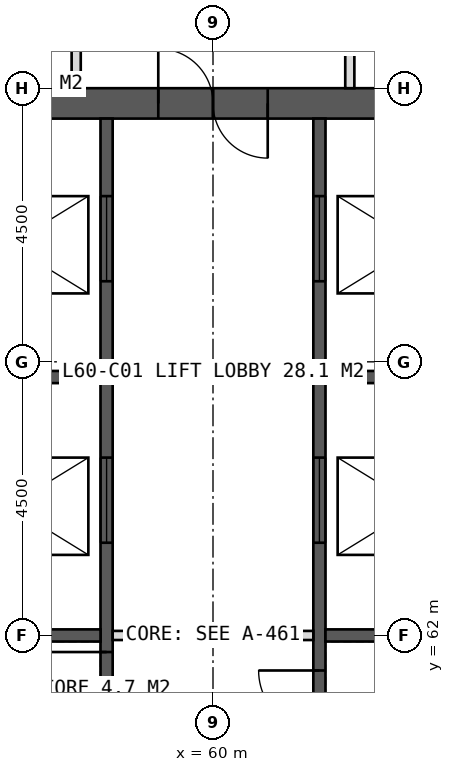
"""IFC4 building model, lengths in metres.
Left out: names, types, materials, properties, quantities, classifications, styles, units other than length and angle.
Written with IfcOpenShell. Run it as: python <this file> out.ifc"""

import sys

from ifc_helpers import new_model, si_unit, direction, frame, frame_2d, origin, place, context, subcontext, project, spatial, rectangle, extrude, element, fill, save


model = new_model("IFC4")
c1 = context("Model", 3, precision=1e-05, world=origin(), true_north=direction((0.0, 1.0)))
c2 = subcontext(c1, "Body", "Model", "MODEL_VIEW")
j1 = project(units=[si_unit("LENGTHUNIT", "METRE"), si_unit("PLANEANGLEUNIT", "RADIAN")], contexts=[c1])
p1 = place(None, origin())
s1 = spatial("IfcSite", under=j1, at=p1, CompositionType="ELEMENT")
p2 = place(p1, origin())
s2 = spatial("IfcBuilding", under=s1, at=p2, CompositionType="ELEMENT")
p3 = place(p2, frame((0.0, 0.0, 250.0)))
s3 = spatial("IfcBuildingStorey", under=s2, at=p3, CompositionType="ELEMENT", Elevation=250.0)
p4 = place(p3, frame((51.0, 70.75, 0.0), z_axis=(0.0, 0.0, 1.0), x_axis=(1.0, 0.0, 0.0)))
e1 = element("IfcWall", 1, at=p4, inside=s3, PredefinedType="SHEAR", context=c2, shape_type="SweptSolid", body=[
    extrude(rectangle(XDim=18.0, YDim=0.5, at=frame_2d((9.0, 0.0))), origin(), (0.0, 0.0, 1.0), 4.0),
])
p5 = place(p4, frame((8.1, 0.0, 0.0)))
e2 = element("IfcOpeningElement", 2, at=p5, cuts=e1, PredefinedType="OPENING", context=c2, shape_type="SweptSolid", body=[
    extrude(rectangle(XDim=1.8, YDim=2.2, at=frame_2d((0.9, 1.1))), frame((0.0, 0.26, 0.0), z_axis=(0.0, -1.0, 0.0), x_axis=(1.0, 0.0, 0.0)), (0.0, 0.0, 1.0), 0.52),
])
p6 = place(p3, frame((58.25, 53.5, 0.0), z_axis=(0.0, 0.0, 1.0), x_axis=(0.0, 1.0, 0.0)))
e3 = element("IfcWall", 3, at=p6, inside=s3, PredefinedType="SHEAR", context=c2, shape_type="SweptSolid", body=[
    extrude(rectangle(XDim=17.0, YDim=0.2, at=frame_2d((8.5, 0.0))), origin(), (0.0, 0.0, 1.0), 4.0),
])
p7 = place(p6, frame((0.393, 0.0, 0.0)))
e4 = element("IfcOpeningElement", 4, at=p7, cuts=e3, PredefinedType="OPENING", context=c2, shape_type="SweptSolid", body=[
    extrude(rectangle(XDim=1.0, YDim=2.1, at=frame_2d((0.5, 1.05))), frame((0.0, 0.11, 0.0), z_axis=(0.0, -1.0, 0.0), x_axis=(1.0, 0.0, 0.0)), (0.0, 0.0, 1.0), 0.22),
])
p8 = place(p6, frame((2.542, 0.0, 0.0)))
e5 = element("IfcOpeningElement", 5, at=p8, cuts=e3, PredefinedType="OPENING", context=c2, shape_type="SweptSolid", body=[
    extrude(rectangle(XDim=1.0, YDim=2.1, at=frame_2d((0.5, 1.05))), frame((0.0, 0.11, 0.0), z_axis=(0.0, -1.0, 0.0), x_axis=(1.0, 0.0, 0.0)), (0.0, 0.0, 1.0), 0.22),
])
p9 = place(p6, frame((5.127, 0.0, 0.0)))
e6 = element("IfcOpeningElement", 6, at=p9, cuts=e3, PredefinedType="OPENING", context=c2, shape_type="SweptSolid", body=[
    extrude(rectangle(XDim=1.0, YDim=2.1, at=frame_2d((0.5, 1.05))), frame((0.0, 0.11, 0.0), z_axis=(0.0, -1.0, 0.0), x_axis=(1.0, 0.0, 0.0)), (0.0, 0.0, 1.0), 0.22),
])
p10 = place(p6, frame((7.228, 0.0, 0.0)))
e7 = element("IfcOpeningElement", 7, at=p10, cuts=e3, PredefinedType="OPENING", context=c2, shape_type="SweptSolid", body=[
    extrude(rectangle(XDim=1.0, YDim=2.1, at=frame_2d((0.5, 1.05))), frame((0.0, 0.11, 0.0), z_axis=(0.0, -1.0, 0.0), x_axis=(1.0, 0.0, 0.0)), (0.0, 0.0, 1.0), 0.22),
])
p11 = place(p6, frame((10.025, 0.0, 0.0)))
e8 = element("IfcOpeningElement", 8, at=p11, cuts=e3, PredefinedType="OPENING", context=c2, shape_type="SweptSolid", body=[
    extrude(rectangle(XDim=1.4, YDim=2.2, at=frame_2d((0.7, 1.1))), frame((0.0, 0.11, 0.0), z_axis=(0.0, -1.0, 0.0), x_axis=(1.0, 0.0, 0.0)), (0.0, 0.0, 1.0), 0.22),
])
p12 = place(p6, frame((14.325, 0.0, 0.0)))
e9 = element("IfcOpeningElement", 9, at=p12, cuts=e3, PredefinedType="OPENING", context=c2, shape_type="SweptSolid", body=[
    extrude(rectangle(XDim=1.4, YDim=2.2, at=frame_2d((0.7, 1.1))), frame((0.0, 0.11, 0.0), z_axis=(0.0, -1.0, 0.0), x_axis=(1.0, 0.0, 0.0)), (0.0, 0.0, 1.0), 0.22),
])
p13 = place(p3, frame((61.75, 53.5, 0.0), z_axis=(0.0, 0.0, 1.0), x_axis=(0.0, 1.0, 0.0)))
e10 = element("IfcWall", 10, at=p13, inside=s3, PredefinedType="SHEAR", context=c2, shape_type="SweptSolid", body=[
    extrude(rectangle(XDim=17.0, YDim=0.2, at=frame_2d((8.5, 0.0))), origin(), (0.0, 0.0, 1.0), 4.0),
])
p14 = place(p13, frame((0.6, 0.0, 0.0)))
e11 = element("IfcOpeningElement", 11, at=p14, cuts=e10, PredefinedType="OPENING", context=c2, shape_type="SweptSolid", body=[
    extrude(rectangle(XDim=1.0, YDim=2.1, at=frame_2d((0.5, 1.05))), frame((0.0, 0.11, 0.0), z_axis=(0.0, -1.0, 0.0), x_axis=(1.0, 0.0, 0.0)), (0.0, 0.0, 1.0), 0.22),
])
p15 = place(p13, frame((2.75, 0.0, 0.0)))
e12 = element("IfcOpeningElement", 12, at=p15, cuts=e10, PredefinedType="OPENING", context=c2, shape_type="SweptSolid", body=[
    extrude(rectangle(XDim=1.0, YDim=2.1, at=frame_2d((0.5, 1.05))), frame((0.0, 0.11, 0.0), z_axis=(0.0, -1.0, 0.0), x_axis=(1.0, 0.0, 0.0)), (0.0, 0.0, 1.0), 0.22),
])
p16 = place(p13, frame((4.824, 0.0, 0.0)))
e13 = element("IfcOpeningElement", 13, at=p16, cuts=e10, PredefinedType="OPENING", context=c2, shape_type="SweptSolid", body=[
    extrude(rectangle(XDim=1.0, YDim=2.1, at=frame_2d((0.5, 1.05))), frame((0.0, 0.11, 0.0), z_axis=(0.0, -1.0, 0.0), x_axis=(1.0, 0.0, 0.0)), (0.0, 0.0, 1.0), 0.22),
])
p17 = place(p13, frame((6.924, 0.0, 0.0)))
e14 = element("IfcOpeningElement", 14, at=p17, cuts=e10, PredefinedType="OPENING", context=c2, shape_type="SweptSolid", body=[
    extrude(rectangle(XDim=1.0, YDim=2.1, at=frame_2d((0.5, 1.05))), frame((0.0, 0.11, 0.0), z_axis=(0.0, -1.0, 0.0), x_axis=(1.0, 0.0, 0.0)), (0.0, 0.0, 1.0), 0.22),
])
p18 = place(p13, frame((10.025, 0.0, 0.0)))
e15 = element("IfcOpeningElement", 15, at=p18, cuts=e10, PredefinedType="OPENING", context=c2, shape_type="SweptSolid", body=[
    extrude(rectangle(XDim=1.4, YDim=2.2, at=frame_2d((0.7, 1.1))), frame((0.0, 0.11, 0.0), z_axis=(0.0, -1.0, 0.0), x_axis=(1.0, 0.0, 0.0)), (0.0, 0.0, 1.0), 0.22),
])
p19 = place(p13, frame((14.325, 0.0, 0.0)))
e16 = element("IfcOpeningElement", 16, at=p19, cuts=e10, PredefinedType="OPENING", context=c2, shape_type="SweptSolid", body=[
    extrude(rectangle(XDim=1.4, YDim=2.2, at=frame_2d((0.7, 1.1))), frame((0.0, 0.11, 0.0), z_axis=(0.0, -1.0, 0.0), x_axis=(1.0, 0.0, 0.0)), (0.0, 0.0, 1.0), 0.22),
])
for number, where, z_axis, x_axis in (
    (17, (55.1, 62.0, 0.0), (0.0, 0.0, 1.0), (1.0, 0.0, 0.0)),
    (18, (61.85, 62.0, 0.0), (0.0, 0.0, 1.0), (1.0, 0.0, 0.0)),
    (19, (55.1, 66.25, 0.0), (0.0, 0.0, 1.0), (1.0, 0.0, 0.0)),
    (20, (61.85, 66.25, 0.0), (0.0, 0.0, 1.0), (1.0, 0.0, 0.0)),
):
    element("IfcWall", number, at=place(p3, frame(where, z_axis=z_axis, x_axis=x_axis)), inside=s3, PredefinedType="SHEAR", context=c2, shape_type="SweptSolid", body=[
        extrude(rectangle(XDim=3.05, YDim=0.2, at=frame_2d((1.525, 0.0))), origin(), (0.0, 0.0, 1.0), 4.0),
    ])
for number, where, z_axis, x_axis in (
    (21, (57.75, 71.0, 0.0), (0.0, 0.0, 1.0), (0.0, 1.0, 0.0)),
    (22, (62.25, 71.0, 0.0), (0.0, 0.0, 1.0), (0.0, 1.0, 0.0)),
):
    element("IfcWall", number, at=place(p3, frame(where, z_axis=z_axis, x_axis=x_axis)), inside=s3, PredefinedType="PARTITIONING", context=c2, shape_type="SweptSolid", body=[
        extrude(rectangle(XDim=1.5, YDim=0.15, at=frame_2d((0.75, 0.0))), origin(), (0.0, 0.0, 1.0), 3.75),
    ])
p20 = place(p3, frame((58.35, 62.0, 0.0), z_axis=(0.0, 0.0, 1.0), x_axis=(1.0, 0.0, 0.0)))
e23 = element("IfcWall", 23, at=p20, inside=s3, PredefinedType="PARTITIONING", context=c2, shape_type="SweptSolid", body=[
    extrude(rectangle(XDim=3.3, YDim=0.15, at=frame_2d((1.65, 0.0))), origin(), (0.0, 0.0, 1.0), 3.75),
])
p21 = place(p5, origin())
e24 = element("IfcDoor", 24, at=p21, inside=s3, OperationType="DOUBLE_DOOR_SINGLE_SWING", PredefinedType="DOOR", context=c2, shape_type="SweptSolid", body=[
    extrude(rectangle(XDim=1.8, YDim=2.2, at=frame_2d((0.9, 1.1))), frame((0.0, 0.025, 0.0), z_axis=(0.0, -1.0, 0.0), x_axis=(1.0, 0.0, 0.0)), (0.0, 0.0, 1.0), 0.05),
])
fill(e2, e24)
p22 = place(p10, origin())
e25 = element("IfcDoor", 25, at=p22, inside=s3, OperationType="SINGLE_SWING_RIGHT", PredefinedType="DOOR", context=c2, shape_type="SweptSolid", body=[
    extrude(rectangle(XDim=1.0, YDim=2.1, at=frame_2d((0.5, 1.05))), frame((0.0, 0.025, 0.0), z_axis=(0.0, -1.0, 0.0), x_axis=(1.0, 0.0, 0.0)), (0.0, 0.0, 1.0), 0.05),
])
fill(e7, e25)
p23 = place(p17, origin())
e26 = element("IfcDoor", 26, at=p23, inside=s3, OperationType="SINGLE_SWING_RIGHT", PredefinedType="DOOR", context=c2, shape_type="SweptSolid", body=[
    extrude(rectangle(XDim=1.0, YDim=2.1, at=frame_2d((0.5, 1.05))), frame((0.0, 0.025, 0.0), z_axis=(0.0, -1.0, 0.0), x_axis=(1.0, 0.0, 0.0)), (0.0, 0.0, 1.0), 0.05),
])
fill(e14, e26)
p24 = place(p11, origin())
e27 = element("IfcDoor", 27, at=p24, inside=s3, OperationType="SLIDING_TO_LEFT", PredefinedType="DOOR", context=c2, shape_type="SweptSolid", body=[
    extrude(rectangle(XDim=1.4, YDim=2.2, at=frame_2d((0.7, 1.1))), frame((0.0, 0.025, 0.0), z_axis=(0.0, -1.0, 0.0), x_axis=(1.0, 0.0, 0.0)), (0.0, 0.0, 1.0), 0.05),
])
fill(e8, e27)
p25 = place(p18, origin())
e28 = element("IfcDoor", 28, at=p25, inside=s3, OperationType="SLIDING_TO_LEFT", PredefinedType="DOOR", context=c2, shape_type="SweptSolid", body=[
    extrude(rectangle(XDim=1.4, YDim=2.2, at=frame_2d((0.7, 1.1))), frame((0.0, 0.025, 0.0), z_axis=(0.0, -1.0, 0.0), x_axis=(1.0, 0.0, 0.0)), (0.0, 0.0, 1.0), 0.05),
])
fill(e15, e28)
p26 = place(p12, origin())
e29 = element("IfcDoor", 29, at=p26, inside=s3, OperationType="SLIDING_TO_LEFT", PredefinedType="DOOR", context=c2, shape_type="SweptSolid", body=[
    extrude(rectangle(XDim=1.4, YDim=2.2, at=frame_2d((0.7, 1.1))), frame((0.0, 0.025, 0.0), z_axis=(0.0, -1.0, 0.0), x_axis=(1.0, 0.0, 0.0)), (0.0, 0.0, 1.0), 0.05),
])
fill(e9, e29)
p27 = place(p19, origin())
e30 = element("IfcDoor", 30, at=p27, inside=s3, OperationType="SLIDING_TO_LEFT", PredefinedType="DOOR", context=c2, shape_type="SweptSolid", body=[
    extrude(rectangle(XDim=1.4, YDim=2.2, at=frame_2d((0.7, 1.1))), frame((0.0, 0.025, 0.0), z_axis=(0.0, -1.0, 0.0), x_axis=(1.0, 0.0, 0.0)), (0.0, 0.0, 1.0), 0.05),
])
fill(e16, e30)
save(model, sys.argv[1])
